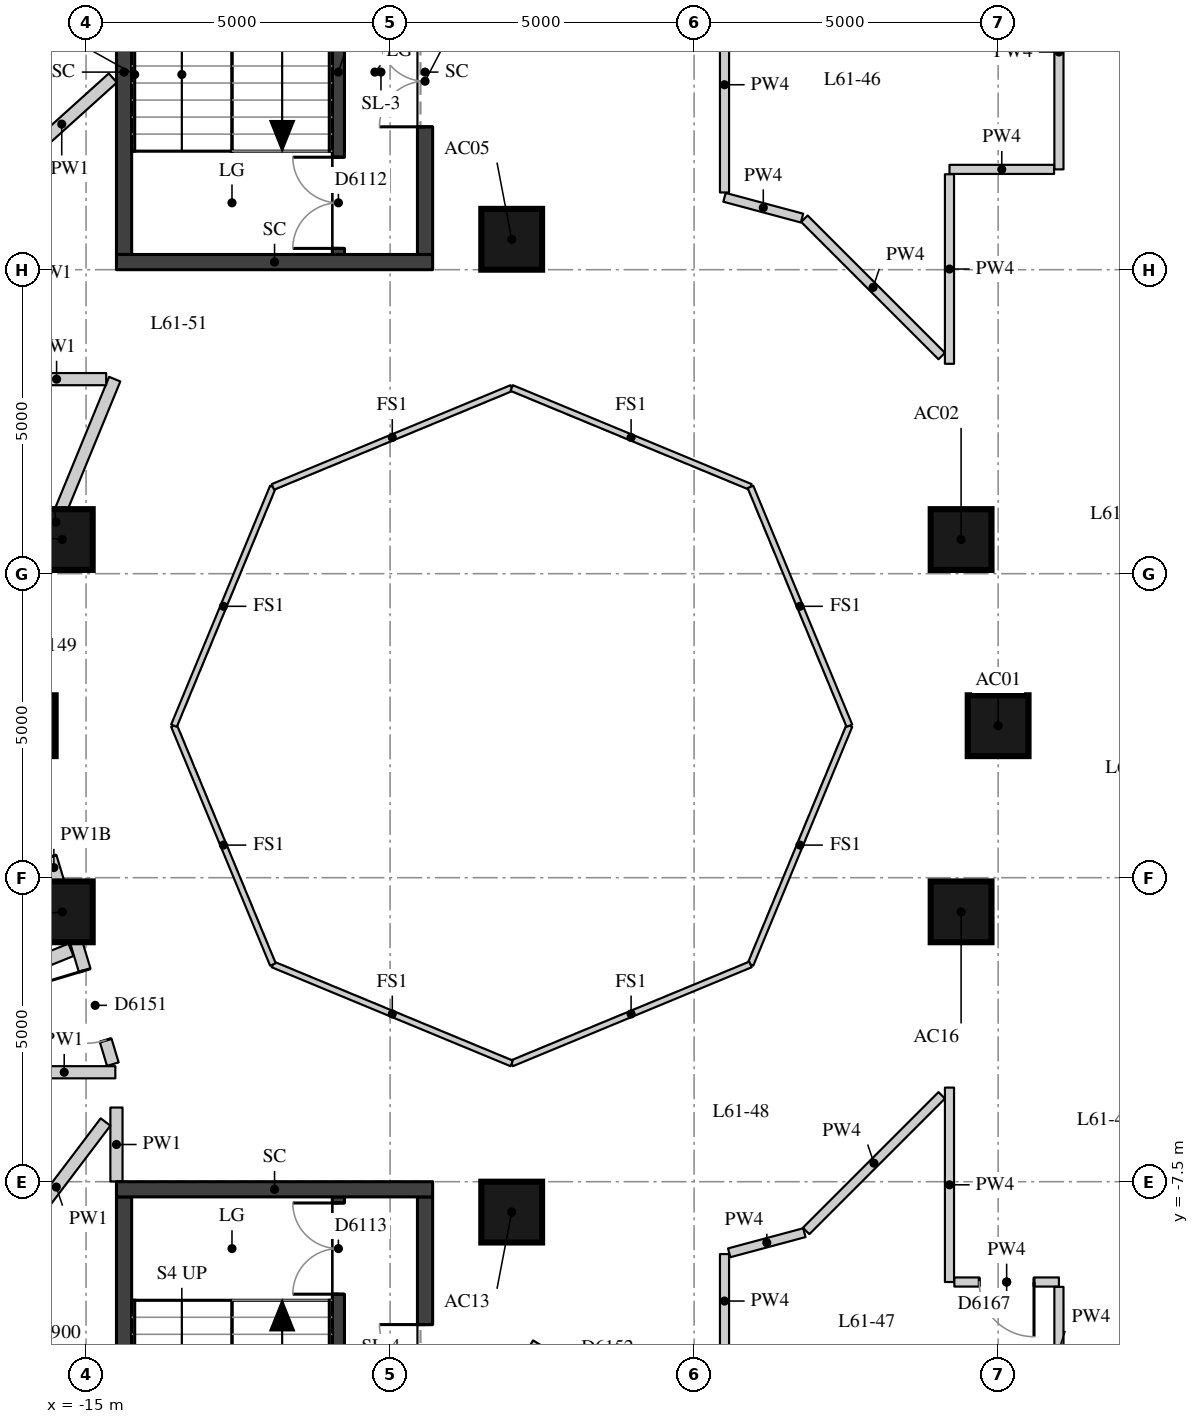
"""IFC4 building model, lengths in metres.
Left out: names, types, materials, properties, quantities, classifications, styles, units other than length and angle.
Written with IfcOpenShell. Run it as: python <this file> out.ifc"""

import sys

from ifc_helpers import new_model, si_unit, direction, frame, frame_2d, origin, origin_2d, place, context, subcontext, project, spatial, rectangle, extrude, element, fill, save


model = new_model("IFC4")
c1 = context("Model", 3, precision=1e-05, world=origin(), true_north=direction((0.0, 1.0)))
c2 = subcontext(c1, "Body", "Model", "MODEL_VIEW")
j1 = project(units=[si_unit("LENGTHUNIT", "METRE"), si_unit("PLANEANGLEUNIT", "RADIAN")], contexts=[c1])
p1 = place(None, origin())
s1 = spatial("IfcSite", under=j1, at=p1, CompositionType="ELEMENT")
p2 = place(p1, origin())
s2 = spatial("IfcBuilding", under=s1, at=p2, CompositionType="ELEMENT")
p3 = place(p2, frame((0.0, 0.0, 215.6)))
s3 = spatial("IfcBuildingStorey", under=s2, at=p3, CompositionType="ELEMENT", Elevation=215.6)
for number, where, z_axis, x_axis in (
    (1, (0.0, 0.0, 0.0), (0.0, 0.0, 1.0), (1.0, 0.0, 0.0)),
    (2, (-0.609, 3.062, 0.0), (0.0, 0.0, 1.0), (1.0, 0.0, 0.0)),
    (3, (-8.0, 8.0, 0.0), (0.0, 0.0, 1.0), (1.0, 0.0, 0.0)),
    (4, (-15.391, 3.062, 0.0), (0.0, 0.0, 1.0), (1.0, 0.0, 0.0)),
    (5, (-16.0, 0.0, 0.0), (0.0, 0.0, 1.0), (1.0, 0.0, 0.0)),
    (6, (-15.391, -3.062, 0.0), (0.0, 0.0, 1.0), (1.0, 0.0, 0.0)),
    (7, (-8.0, -8.0, 0.0), (0.0, 0.0, 1.0), (1.0, 0.0, 0.0)),
    (8, (-0.609, -3.062, 0.0), (0.0, 0.0, 1.0), (1.0, 0.0, 0.0)),
):
    element("IfcColumn", number, at=place(p3, frame(where, z_axis=z_axis, x_axis=x_axis)), inside=s3, PredefinedType="COLUMN", context=c2, shape_type="SweptSolid", body=[
        extrude(rectangle(XDim=1.0, YDim=1.0, at=origin_2d()), origin(), (0.0, 0.0, 1.0), 3.3),
    ])
p4 = place(p3, frame((-10.85, 7.75, 0.0), z_axis=(0.0, 0.0, 1.0), x_axis=(0.0, 1.0, 0.0)))
e9 = element("IfcWall", 9, at=p4, inside=s3, PredefinedType="SHEAR", context=c2, shape_type="SweptSolid", body=[
    extrude(rectangle(XDim=6.0, YDim=0.2, at=frame_2d((3.0, 0.0))), origin(), (0.0, 0.0, 1.0), 3.02),
])
p5 = place(p4, frame((0.1, 0.0, 0.0)))
e10 = element("IfcOpeningElement", 10, at=p5, cuts=e9, PredefinedType="OPENING", context=c2, shape_type="SweptSolid", body=[
    extrude(rectangle(XDim=1.5, YDim=2.1, at=frame_2d((0.75, 1.05))), frame((0.0, 0.11, 0.0), z_axis=(0.0, -1.0, 0.0), x_axis=(1.0, 0.0, 0.0)), (0.0, 0.0, 1.0), 0.22),
])
p6 = place(p3, frame((-10.85, -13.75, 0.0), z_axis=(0.0, 0.0, 1.0), x_axis=(0.0, 1.0, 0.0)))
e11 = element("IfcWall", 11, at=p6, inside=s3, PredefinedType="SHEAR", context=c2, shape_type="SweptSolid", body=[
    extrude(rectangle(XDim=6.0, YDim=0.2, at=frame_2d((3.0, 0.0))), origin(), (0.0, 0.0, 1.0), 3.02),
])
p7 = place(p6, frame((4.4, 0.0, 0.0)))
e12 = element("IfcOpeningElement", 12, at=p7, cuts=e11, PredefinedType="OPENING", context=c2, shape_type="SweptSolid", body=[
    extrude(rectangle(XDim=1.5, YDim=2.1, at=frame_2d((0.75, 1.05))), frame((0.0, 0.11, 0.0), z_axis=(0.0, -1.0, 0.0), x_axis=(1.0, 0.0, 0.0)), (0.0, 0.0, 1.0), 0.22),
])
p8 = place(p3, frame((-14.375, 7.75, -0.28), z_axis=(0.0, 0.0, 1.0), x_axis=(0.0, 1.0, 0.0)))
e13 = element("IfcWall", 13, at=p8, inside=s3, PredefinedType="SHEAR", context=c2, shape_type="SweptSolid", body=[
    extrude(rectangle(XDim=6.0, YDim=0.25, at=frame_2d((3.0, 0.0))), origin(), (0.0, 0.0, 1.0), 3.3),
])
p9 = place(p3, frame((-9.425, 7.75, -0.28), z_axis=(0.0, 0.0, 1.0), x_axis=(0.0, 1.0, 0.0)))
e14 = element("IfcWall", 14, at=p9, inside=s3, PredefinedType="SHEAR", context=c2, shape_type="SweptSolid", body=[
    extrude(rectangle(XDim=6.0, YDim=0.25, at=frame_2d((3.0, 0.0))), origin(), (0.0, 0.0, 1.0), 3.3),
])
p10 = place(p9, frame((2.1, 0.0, 0.28)))
e15 = element("IfcOpeningElement", 15, at=p10, cuts=e14, PredefinedType="OPENING", context=c2, shape_type="SweptSolid", body=[
    extrude(rectangle(XDim=1.5, YDim=2.1, at=frame_2d((0.75, 1.05))), frame((0.0, 0.135, 0.0), z_axis=(0.0, -1.0, 0.0), x_axis=(1.0, 0.0, 0.0)), (0.0, 0.0, 1.0), 0.27),
])
p11 = place(p3, frame((-14.5, 7.625, -0.28), z_axis=(0.0, 0.0, 1.0), x_axis=(1.0, 0.0, 0.0)))
e16 = element("IfcWall", 16, at=p11, inside=s3, PredefinedType="SHEAR", context=c2, shape_type="SweptSolid", body=[
    extrude(rectangle(XDim=5.2, YDim=0.25, at=frame_2d((2.6, 0.0))), origin(), (0.0, 0.0, 1.0), 3.3),
])
p12 = place(p3, frame((-14.375, -13.75, -0.28), z_axis=(0.0, 0.0, 1.0), x_axis=(0.0, 1.0, 0.0)))
e17 = element("IfcWall", 17, at=p12, inside=s3, PredefinedType="SHEAR", context=c2, shape_type="SweptSolid", body=[
    extrude(rectangle(XDim=6.0, YDim=0.25, at=frame_2d((3.0, 0.0))), origin(), (0.0, 0.0, 1.0), 3.3),
])
p13 = place(p3, frame((-9.425, -13.75, -0.28), z_axis=(0.0, 0.0, 1.0), x_axis=(0.0, 1.0, 0.0)))
e18 = element("IfcWall", 18, at=p13, inside=s3, PredefinedType="SHEAR", context=c2, shape_type="SweptSolid", body=[
    extrude(rectangle(XDim=6.0, YDim=0.25, at=frame_2d((3.0, 0.0))), origin(), (0.0, 0.0, 1.0), 3.3),
])
p14 = place(p13, frame((2.4, 0.0, 0.28)))
e19 = element("IfcOpeningElement", 19, at=p14, cuts=e18, PredefinedType="OPENING", context=c2, shape_type="SweptSolid", body=[
    extrude(rectangle(XDim=1.5, YDim=2.1, at=frame_2d((0.75, 1.05))), frame((0.0, 0.135, 0.0), z_axis=(0.0, -1.0, 0.0), x_axis=(1.0, 0.0, 0.0)), (0.0, 0.0, 1.0), 0.27),
])
p15 = place(p3, frame((-14.5, -7.625, -0.28), z_axis=(0.0, 0.0, 1.0), x_axis=(1.0, 0.0, 0.0)))
e20 = element("IfcWall", 20, at=p15, inside=s3, PredefinedType="SHEAR", context=c2, shape_type="SweptSolid", body=[
    extrude(rectangle(XDim=5.2, YDim=0.25, at=frame_2d((2.6, 0.0))), origin(), (0.0, 0.0, 1.0), 3.3),
])
p16 = place(p3, frame((-2.528, -13.4, 0.0), z_axis=(0.0, 0.0, 1.0), x_axis=(-0.850088088191, 0.526640524757, 0.0)))
e21 = element("IfcWall", 21, at=p16, inside=s3, PredefinedType="PARTITIONING", context=c2, shape_type="SweptSolid", body=[
    extrude(rectangle(XDim=6.084, YDim=0.2, at=frame_2d((3.042, 0.0))), origin(), (0.0, 0.0, 1.0), 3.02),
])
p17 = place(p16, frame((4.031, 0.0, 0.0)))
e22 = element("IfcOpeningElement", 22, at=p17, cuts=e21, PredefinedType="OPENING", context=c2, shape_type="SweptSolid", body=[
    extrude(rectangle(XDim=1.1, YDim=2.1, at=frame_2d((0.55, 1.05))), frame((0.0, 0.11, 0.0), z_axis=(0.0, -1.0, 0.0), x_axis=(1.0, 0.0, 0.0)), (0.0, 0.0, 1.0), 0.22),
])
p18 = place(p16, frame((1.206, 0.0, 0.0)))
e23 = element("IfcOpeningElement", 23, at=p18, cuts=e21, PredefinedType="OPENING", context=c2, shape_type="SweptSolid", body=[
    extrude(rectangle(XDim=0.9, YDim=2.1, at=frame_2d((0.45, 1.05))), frame((0.0, 0.11, 0.0), z_axis=(0.0, -1.0, 0.0), x_axis=(1.0, 0.0, 0.0)), (0.0, 0.0, 1.0), 0.22),
])
p19 = place(p3, frame((-14.5, -7.496, 0.0), z_axis=(0.0, 0.0, 1.0), x_axis=(0.0, 1.0, 0.0)))
e24 = element("IfcWall", 24, at=p19, inside=s3, PredefinedType="PARTITIONING", context=c2, shape_type="SweptSolid", body=[
    extrude(rectangle(XDim=1.216, YDim=0.2, at=frame_2d((0.608, 0.0))), origin(), (0.0, 0.0, 1.0), 3.02),
])
p20 = place(p3, frame((-14.679, -6.518, 0.0), z_axis=(0.0, 0.0, 1.0), x_axis=(-0.603820908912, -0.797120009761, 0.0)))
e25 = element("IfcWall", 25, at=p20, inside=s3, PredefinedType="PARTITIONING", context=c2, shape_type="SweptSolid", body=[
    extrude(rectangle(XDim=2.684, YDim=0.2, at=frame_2d((1.342, 0.0))), origin(), (0.0, 0.0, 1.0), 3.02),
])
p21 = place(p3, frame((-16.2, -5.7, 0.0), z_axis=(0.0, 0.0, 1.0), x_axis=(1.0, 0.0, 0.0)))
e26 = element("IfcWall", 26, at=p21, inside=s3, PredefinedType="PARTITIONING", context=c2, shape_type="SweptSolid", body=[
    extrude(rectangle(XDim=1.681, YDim=0.2, at=frame_2d((0.841, 0.0))), origin(), (0.0, 0.0, 1.0), 3.02),
])
p22 = place(p3, frame((-14.56, -5.567, 0.0), z_axis=(0.0, 0.0, 1.0), x_axis=(-0.287410918602, 0.95780737305, 0.0)))
e27 = element("IfcWall", 27, at=p22, inside=s3, PredefinedType="PARTITIONING", context=c2, shape_type="SweptSolid", body=[
    extrude(rectangle(XDim=6.751, YDim=0.2, at=frame_2d((3.376, 0.0))), origin(), (0.0, 0.0, 1.0), 2.52),
])
p23 = place(p22, frame((3.561, 0.0, 0.0)))
e28 = element("IfcOpeningElement", 28, at=p23, cuts=e27, PredefinedType="OPENING", context=c2, shape_type="SweptSolid", body=[
    extrude(rectangle(XDim=1.1, YDim=2.1, at=frame_2d((0.55, 1.05))), frame((0.0, 0.11, 0.0), z_axis=(0.0, -1.0, 0.0), x_axis=(1.0, 0.0, 0.0)), (0.0, 0.0, 1.0), 0.22),
])
p24 = place(p22, frame((0.41, 0.0, 0.0)))
e29 = element("IfcOpeningElement", 29, at=p24, cuts=e27, PredefinedType="OPENING", context=c2, shape_type="SweptSolid", body=[
    extrude(rectangle(XDim=1.2, YDim=2.1, at=frame_2d((0.6, 1.05))), frame((0.0, 0.11, 0.0), z_axis=(0.0, -1.0, 0.0), x_axis=(1.0, 0.0, 0.0)), (0.0, 0.0, 1.0), 0.22),
])
p25 = place(p3, frame((-16.462, 0.993, 0.0), z_axis=(0.0, 0.0, 1.0), x_axis=(0.37991958703, 0.925019517303, 0.0)))
e30 = element("IfcWall", 30, at=p25, inside=s3, PredefinedType="PARTITIONING", context=c2, shape_type="SweptSolid", body=[
    extrude(rectangle(XDim=5.089, YDim=0.2, at=frame_2d((2.544, 0.0))), origin(), (0.0, 0.0, 1.0), 2.52),
])
p26 = place(p25, frame((0.36, 0.0, 0.0)))
e31 = element("IfcOpeningElement", 31, at=p26, cuts=e30, PredefinedType="OPENING", context=c2, shape_type="SweptSolid", body=[
    extrude(rectangle(XDim=1.1, YDim=2.1, at=frame_2d((0.55, 1.05))), frame((0.0, 0.11, 0.0), z_axis=(0.0, -1.0, 0.0), x_axis=(1.0, 0.0, 0.0)), (0.0, 0.0, 1.0), 0.22),
])
p27 = place(p3, frame((-14.669, 5.7, 0.0), z_axis=(0.0, 0.0, 1.0), x_axis=(-1.0, 0.0, 0.0)))
e32 = element("IfcWall", 32, at=p27, inside=s3, PredefinedType="PARTITIONING", context=c2, shape_type="SweptSolid", body=[
    extrude(rectangle(XDim=1.631, YDim=0.2, at=frame_2d((0.815, 0.0))), origin(), (0.0, 0.0, 1.0), 3.02),
])
p28 = place(p3, frame((-16.24, 9.136, 0.0), z_axis=(0.0, 0.0, 1.0), x_axis=(0.74251608424, 0.66982823518, 0.0)))
e33 = element("IfcWall", 33, at=p28, inside=s3, PredefinedType="PARTITIONING", context=c2, shape_type="SweptSolid", body=[
    extrude(rectangle(XDim=2.264, YDim=0.2, at=frame_2d((1.132, 0.0))), origin(), (0.0, 0.0, 1.0), 3.02),
])
p29 = place(p3, frame((1.0, 13.011, 0.0), z_axis=(0.0, 0.0, 1.0), x_axis=(0.0, -1.0, 0.0)))
e34 = element("IfcWall", 34, at=p29, inside=s3, PredefinedType="PARTITIONING", context=c2, shape_type="SweptSolid", body=[
    extrude(rectangle(XDim=3.861, YDim=0.15, at=frame_2d((1.93, 0.0))), origin(), (0.0, 0.0, 1.0), 3.02),
])
p30 = place(p3, frame((0.92, 9.15, 0.0), z_axis=(0.0, 0.0, 1.0), x_axis=(-1.0, 0.0, 0.0)))
e35 = element("IfcWall", 35, at=p30, inside=s3, PredefinedType="PARTITIONING", context=c2, shape_type="SweptSolid", body=[
    extrude(rectangle(XDim=1.72, YDim=0.15, at=frame_2d((0.86, 0.0))), origin(), (0.0, 0.0, 1.0), 3.02),
])
p31 = place(p3, frame((-0.8, 9.07, 0.0), z_axis=(0.0, 0.0, 1.0), x_axis=(0.0, -1.0, 0.0)))
e36 = element("IfcWall", 36, at=p31, inside=s3, PredefinedType="PARTITIONING", context=c2, shape_type="SweptSolid", body=[
    extrude(rectangle(XDim=3.118, YDim=0.15, at=frame_2d((1.559, 0.0))), origin(), (0.0, 0.0, 1.0), 3.02),
])
p32 = place(p3, frame((-0.927, 6.08, 0.0), z_axis=(0.0, 0.0, 1.0), x_axis=(-0.707106781187, 0.707106781187, 0.0)))
e37 = element("IfcWall", 37, at=p32, inside=s3, PredefinedType="PARTITIONING", context=c2, shape_type="SweptSolid", body=[
    extrude(rectangle(XDim=3.194, YDim=0.15, at=frame_2d((1.597, 0.0))), origin(), (0.0, 0.0, 1.0), 3.02),
])
p33 = place(p3, frame((-3.225, 8.348, 0.0), z_axis=(0.0, 0.0, 1.0), x_axis=(-0.965915035697, 0.258859312783, 0.0)))
e38 = element("IfcWall", 38, at=p33, inside=s3, PredefinedType="PARTITIONING", context=c2, shape_type="SweptSolid", body=[
    extrude(rectangle(XDim=1.32, YDim=0.15, at=frame_2d((0.66, 0.0))), origin(), (0.0, 0.0, 1.0), 3.02),
])
p34 = place(p3, frame((-4.5, 8.77, 0.0), z_axis=(0.0, 0.0, 1.0), x_axis=(0.0, 1.0, 0.0)))
e39 = element("IfcWall", 39, at=p34, inside=s3, PredefinedType="PARTITIONING", context=c2, shape_type="SweptSolid", body=[
    extrude(rectangle(XDim=3.543, YDim=0.15, at=frame_2d((1.772, 0.0))), origin(), (0.0, 0.0, 1.0), 3.02),
])
p35 = place(p3, frame((-0.8, -5.952, 0.0), z_axis=(0.0, 0.0, 1.0), x_axis=(0.0, -1.0, 0.0)))
e40 = element("IfcWall", 40, at=p35, inside=s3, PredefinedType="PARTITIONING", context=c2, shape_type="SweptSolid", body=[
    extrude(rectangle(XDim=3.198, YDim=0.15, at=frame_2d((1.599, 0.0))), origin(), (0.0, 0.0, 1.0), 3.02),
])
p36 = place(p3, frame((-0.72, -9.15, 0.0), z_axis=(0.0, 0.0, 1.0), x_axis=(1.0, 0.0, 0.0)))
e41 = element("IfcWall", 41, at=p36, inside=s3, PredefinedType="PARTITIONING", context=c2, shape_type="SweptSolid", body=[
    extrude(rectangle(XDim=1.72, YDim=0.15, at=frame_2d((0.86, 0.0))), origin(), (0.0, 0.0, 1.0), 3.02),
])
p37 = place(p36, frame((0.41, 0.0, 0.0)))
e42 = element("IfcOpeningElement", 42, at=p37, cuts=e41, PredefinedType="OPENING", context=c2, shape_type="SweptSolid", body=[
    extrude(rectangle(XDim=0.9, YDim=2.1, at=frame_2d((0.45, 1.05))), frame((0.0, 0.085, 0.0), z_axis=(0.0, -1.0, 0.0), x_axis=(1.0, 0.0, 0.0)), (0.0, 0.0, 1.0), 0.17),
])
p38 = place(p3, frame((1.0, -9.23, 0.0), z_axis=(0.0, 0.0, 1.0), x_axis=(0.0, -1.0, 0.0)))
e43 = element("IfcWall", 43, at=p38, inside=s3, PredefinedType="PARTITIONING", context=c2, shape_type="SweptSolid", body=[
    extrude(rectangle(XDim=2.061, YDim=0.15, at=frame_2d((1.03, 0.0))), origin(), (0.0, 0.0, 1.0), 3.02),
])
p39 = place(p3, frame((-4.5, -10.235, 0.0), z_axis=(0.0, 0.0, 1.0), x_axis=(0.0, 1.0, 0.0)))
e44 = element("IfcWall", 44, at=p39, inside=s3, PredefinedType="PARTITIONING", context=c2, shape_type="SweptSolid", body=[
    extrude(rectangle(XDim=1.545, YDim=0.15, at=frame_2d((0.772, 0.0))), origin(), (0.0, 0.0, 1.0), 3.02),
])
p40 = place(p3, frame((-4.423, -8.67, 0.0), z_axis=(0.0, 0.0, 1.0), x_axis=(0.965898680525, 0.258920333232, 0.0)))
e45 = element("IfcWall", 45, at=p40, inside=s3, PredefinedType="PARTITIONING", context=c2, shape_type="SweptSolid", body=[
    extrude(rectangle(XDim=1.281, YDim=0.15, at=frame_2d((0.64, 0.0))), origin(), (0.0, 0.0, 1.0), 3.02),
])
p41 = place(p3, frame((-3.158, -8.31, 0.0), z_axis=(0.0, 0.0, 1.0), x_axis=(0.707106781187, 0.707106781187, 0.0)))
e46 = element("IfcWall", 46, at=p41, inside=s3, PredefinedType="PARTITIONING", context=c2, shape_type="SweptSolid", body=[
    extrude(rectangle(XDim=3.154, YDim=0.15, at=frame_2d((1.577, 0.0))), origin(), (0.0, 0.0, 1.0), 3.02),
])
p42 = place(p3, frame((-22.896, -6.771, 0.0), z_axis=(0.0, 0.0, 1.0), x_axis=(0.92738233242, 0.374114968313, 0.0)))
e47 = element("IfcWall", 47, at=p42, inside=s3, PredefinedType="PARTITIONING", context=c2, shape_type="SweptSolid", body=[
    extrude(rectangle(XDim=8.246, YDim=0.22, at=frame_2d((4.123, 0.0))), origin(), (0.0, 0.0, 1.0), 3.02),
])
for number, where, z_axis, x_axis in (
    (48, (-2.446, 0.0, 0.0), (0.0, 0.0, 1.0), (-0.383, -0.924, 0.0)),
    (49, (-4.073, -3.927, 0.0), (0.0, 0.0, 1.0), (-0.924, -0.383, 0.0)),
    (50, (-8.0, -5.554, 0.0), (0.0, 0.0, 1.0), (-0.924, 0.383, 0.0)),
    (51, (-11.927, -3.927, 0.0), (0.0, 0.0, 1.0), (-0.383, 0.924, 0.0)),
    (52, (-13.554, 0.0, 0.0), (0.0, 0.0, 1.0), (0.383, 0.924, 0.0)),
    (53, (-11.927, 3.927, 0.0), (0.0, 0.0, 1.0), (0.924, 0.383, 0.0)),
    (54, (-8.0, 5.554, 0.0), (0.0, 0.0, 1.0), (0.924, -0.383, 0.0)),
    (55, (-4.073, 3.927, 0.0), (0.0, 0.0, 1.0), (0.383, -0.924, 0.0)),
):
    element("IfcWall", number, at=place(p3, frame(where, z_axis=z_axis, x_axis=x_axis)), inside=s3, PredefinedType="PARTITIONING", context=c2, shape_type="SweptSolid", body=[
        extrude(rectangle(XDim=4.251, YDim=0.1, at=frame_2d((2.125, 0.0))), origin(), (0.0, 0.0, 1.0), 3.02),
    ])
p43 = place(p5, origin())
e56 = element("IfcDoor", 56, at=p43, inside=s3, OperationType="DOUBLE_DOOR_SINGLE_SWING", PredefinedType="DOOR", context=c2, shape_type="SweptSolid", body=[
    extrude(rectangle(XDim=1.5, YDim=2.1, at=frame_2d((0.75, 1.05))), frame((0.0, 0.025, 0.0), z_axis=(0.0, -1.0, 0.0), x_axis=(1.0, 0.0, 0.0)), (0.0, 0.0, 1.0), 0.05),
])
fill(e10, e56)
p44 = place(p7, origin())
e57 = element("IfcDoor", 57, at=p44, inside=s3, OperationType="DOUBLE_DOOR_SINGLE_SWING", PredefinedType="DOOR", context=c2, shape_type="SweptSolid", body=[
    extrude(rectangle(XDim=1.5, YDim=2.1, at=frame_2d((0.75, 1.05))), frame((0.0, 0.025, 0.0), z_axis=(0.0, -1.0, 0.0), x_axis=(1.0, 0.0, 0.0)), (0.0, 0.0, 1.0), 0.05),
])
fill(e12, e57)
p45 = place(p10, origin())
e58 = element("IfcDoor", 58, at=p45, inside=s3, OperationType="DOUBLE_DOOR_SINGLE_SWING", PredefinedType="DOOR", context=c2, shape_type="SweptSolid", body=[
    extrude(rectangle(XDim=1.5, YDim=2.1, at=frame_2d((0.75, 1.05))), frame((0.0, 0.025, 0.0), z_axis=(0.0, -1.0, 0.0), x_axis=(1.0, 0.0, 0.0)), (0.0, 0.0, 1.0), 0.05),
])
fill(e15, e58)
p46 = place(p14, origin())
e59 = element("IfcDoor", 59, at=p46, inside=s3, OperationType="DOUBLE_DOOR_SINGLE_SWING", PredefinedType="DOOR", context=c2, shape_type="SweptSolid", body=[
    extrude(rectangle(XDim=1.5, YDim=2.1, at=frame_2d((0.75, 1.05))), frame((0.0, 0.025, 0.0), z_axis=(0.0, -1.0, 0.0), x_axis=(1.0, 0.0, 0.0)), (0.0, 0.0, 1.0), 0.05),
])
fill(e19, e59)
p47 = place(p24, origin())
e60 = element("IfcDoor", 60, at=p47, inside=s3, OperationType="SINGLE_SWING_RIGHT", PredefinedType="DOOR", context=c2, shape_type="SweptSolid", body=[
    extrude(rectangle(XDim=1.2, YDim=2.1, at=frame_2d((0.6, 1.05))), frame((0.0, 0.025, 0.0), z_axis=(0.0, -1.0, 0.0), x_axis=(1.0, 0.0, 0.0)), (0.0, 0.0, 1.0), 0.05),
])
fill(e29, e60)
p48 = place(p37, origin())
e61 = element("IfcDoor", 61, at=p48, inside=s3, OperationType="SINGLE_SWING_LEFT", PredefinedType="DOOR", context=c2, shape_type="SweptSolid", body=[
    extrude(rectangle(XDim=0.9, YDim=2.1, at=frame_2d((0.45, 1.05))), frame((0.0, 0.025, 0.0), z_axis=(0.0, -1.0, 0.0), x_axis=(1.0, 0.0, 0.0)), (0.0, 0.0, 1.0), 0.05),
])
fill(e42, e61)
save(model, sys.argv[1])
